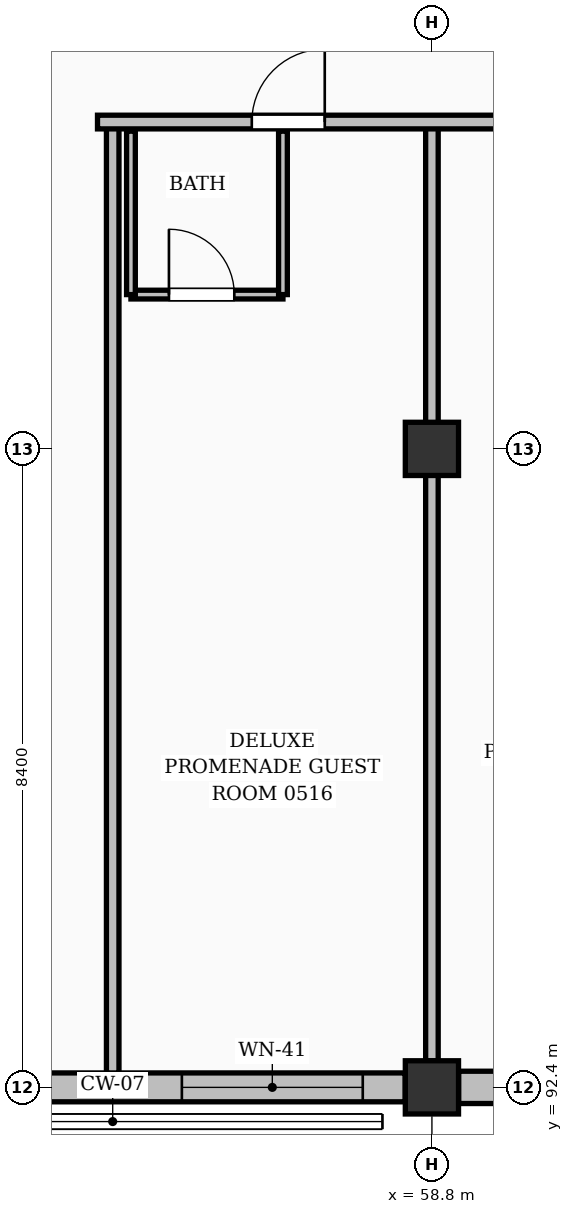
"""IFC4 building model, lengths in metres.
Left out: names, types, materials, properties, quantities, classifications, styles, units other than length and angle.
Written with IfcOpenShell. Run it as: python <this file> out.ifc"""

import sys

from ifc_helpers import new_model, si_unit, direction, frame, frame_2d, origin, origin_2d, place, context, subcontext, project, spatial, rectangle, extrude, element, fill, save


model = new_model("IFC4")
c1 = context("Model", 3, precision=1e-05, world=origin(), true_north=direction((0.0, 1.0)))
c2 = subcontext(c1, "Body", "Model", "MODEL_VIEW")
j1 = project(units=[si_unit("LENGTHUNIT", "METRE"), si_unit("PLANEANGLEUNIT", "RADIAN")], contexts=[c1])
p1 = place(None, origin())
s1 = spatial("IfcSite", under=j1, at=p1, CompositionType="ELEMENT")
p2 = place(p1, origin())
s2 = spatial("IfcBuilding", under=s1, at=p2, CompositionType="ELEMENT")
p3 = place(p2, frame((0.0, 0.0, 18.48)))
s3 = spatial("IfcBuildingStorey", under=s2, at=p3, CompositionType="ELEMENT", Elevation=18.48)
for number, where, z_axis, x_axis in (
    (1, (58.8, 92.4, 0.0), (0.0, 0.0, 1.0), (1.0, 0.0, 0.0)),
    (2, (58.8, 100.8, 0.0), (0.0, 0.0, 1.0), (1.0, 0.0, 0.0)),
):
    element("IfcColumn", number, at=place(p3, frame(where, z_axis=z_axis, x_axis=x_axis)), inside=s3, PredefinedType="COLUMN", context=c2, shape_type="SweptSolid", body=[
        extrude(rectangle(XDim=0.7, YDim=0.7, at=origin_2d()), origin(), (0.0, 0.0, 1.0), 3.36),
    ])
p4 = place(p3, frame((50.751, 92.4, 0.0), z_axis=(0.0, 0.0, 1.0), x_axis=(1.0, 0.0, 0.0)))
e3 = element("IfcWall", 3, at=p4, inside=s3, PredefinedType="SOLIDWALL", context=c2, shape_type="SweptSolid", body=[
    extrude(rectangle(XDim=7.698, YDim=0.38, at=frame_2d((3.849, 0.0))), origin(), (0.0, 0.0, 1.0), 2.494),
])
p5 = place(p4, frame((0.539, 0.0, 0.25)))
e4 = element("IfcOpeningElement", 4, at=p5, cuts=e3, PredefinedType="OPENING", context=c2, shape_type="SweptSolid", body=[
    extrude(rectangle(XDim=2.42, YDim=1.9, at=frame_2d((1.21, 0.95))), frame((0.0, 0.2, 0.0), z_axis=(0.0, -1.0, 0.0), x_axis=(1.0, 0.0, 0.0)), (0.0, 0.0, 1.0), 0.4),
])
p6 = place(p4, frame((4.759, 0.0, 0.25)))
e5 = element("IfcOpeningElement", 5, at=p6, cuts=e3, PredefinedType="OPENING", context=c2, shape_type="SweptSolid", body=[
    extrude(rectangle(XDim=2.38, YDim=2.0, at=frame_2d((1.19, 1.0))), frame((0.0, 0.2, 0.0), z_axis=(0.0, -1.0, 0.0), x_axis=(1.0, 0.0, 0.0)), (0.0, 0.0, 1.0), 0.4),
])
p7 = place(p3, frame((59.151, 92.4, 0.0), z_axis=(0.0, 0.0, 1.0), x_axis=(1.0, 0.0, 0.0)))
e6 = element("IfcWall", 6, at=p7, inside=s3, PredefinedType="SOLIDWALL", context=c2, shape_type="SweptSolid", body=[
    extrude(rectangle(XDim=7.698, YDim=0.425, at=frame_2d((3.849, 0.0))), origin(), (0.0, 0.0, 1.0), 2.494),
])
p8 = place(p7, frame((1.024, 0.0, 0.0)))
e7 = element("IfcOpeningElement", 7, at=p8, cuts=e6, PredefinedType="OPENING", context=c2, shape_type="SweptSolid", body=[
    extrude(rectangle(XDim=1.55, YDim=2.08, at=frame_2d((0.775, 1.04))), frame((0.0, 0.223, 0.0), z_axis=(0.0, -1.0, 0.0), x_axis=(1.0, 0.0, 0.0)), (0.0, 0.0, 1.0), 0.445),
])
p9 = place(p7, frame((4.609, 0.0, 0.25)))
e8 = element("IfcOpeningElement", 8, at=p9, cuts=e6, PredefinedType="OPENING", context=c2, shape_type="SweptSolid", body=[
    extrude(rectangle(XDim=2.38, YDim=2.0, at=frame_2d((1.19, 1.0))), frame((0.0, 0.223, 0.0), z_axis=(0.0, -1.0, 0.0), x_axis=(1.0, 0.0, 0.0)), (0.0, 0.0, 1.0), 0.445),
])
p10 = place(p3, frame((54.84, 102.83, 0.0), z_axis=(0.0, 0.0, 1.0), x_axis=(1.0, 0.0, 0.0)))
e9 = element("IfcWall", 9, at=p10, inside=s3, PredefinedType="PARTITIONING", context=c2, shape_type="SweptSolid", body=[
    extrude(rectangle(XDim=2.0, YDim=0.115, at=frame_2d((1.0, 0.0))), origin(), (0.0, 0.0, 1.0), 3.12),
])
p11 = place(p10, frame((0.5, 0.0, 0.0)))
e10 = element("IfcOpeningElement", 10, at=p11, cuts=e9, PredefinedType="OPENING", context=c2, shape_type="SweptSolid", body=[
    extrude(rectangle(XDim=0.86, YDim=2.05, at=frame_2d((0.43, 1.025))), frame((0.0, 0.067, 0.0), z_axis=(0.0, -1.0, 0.0), x_axis=(1.0, 0.0, 0.0)), (0.0, 0.0, 1.0), 0.135),
])
for number, where, z_axis, x_axis in (
    (11, (54.84, 102.83, 0.0), (0.0, 0.0, 1.0), (0.0, 1.0, 0.0)),
    (12, (56.84, 102.83, 0.0), (0.0, 0.0, 1.0), (0.0, 1.0, 0.0)),
):
    element("IfcWall", number, at=place(p3, frame(where, z_axis=z_axis, x_axis=x_axis)), inside=s3, PredefinedType="PARTITIONING", context=c2, shape_type="SweptSolid", body=[
        extrude(rectangle(XDim=2.15, YDim=0.115, at=frame_2d((1.075, 0.0))), origin(), (0.0, 0.0, 1.0), 3.12),
    ])
p12 = place(p3, frame((54.6, 92.59, 0.0), z_axis=(0.0, 0.0, 1.0), x_axis=(0.0, 1.0, 0.0)))
e13 = element("IfcWall", 13, at=p12, inside=s3, PredefinedType="PARTITIONING", context=c2, shape_type="SweptSolid", body=[
    extrude(rectangle(XDim=12.51, YDim=0.165, at=frame_2d((6.255, 0.0))), origin(), (0.0, 0.0, 1.0), 3.12),
])
p13 = place(p3, frame((58.8, 92.75, 0.0), z_axis=(0.0, 0.0, 1.0), x_axis=(0.0, 1.0, 0.0)))
e14 = element("IfcWall", 14, at=p13, inside=s3, PredefinedType="PARTITIONING", context=c2, shape_type="SweptSolid", body=[
    extrude(rectangle(XDim=12.35, YDim=0.165, at=frame_2d((6.175, 0.0))), origin(), (0.0, 0.0, 1.0), 2.455),
])
p14 = place(p3, frame((54.4, 105.1, 0.0), z_axis=(0.0, 0.0, 1.0), x_axis=(1.0, 0.0, 0.0)))
e15 = element("IfcWall", 15, at=p14, inside=s3, PredefinedType="PARTITIONING", context=c2, shape_type="SweptSolid", body=[
    extrude(rectangle(XDim=29.47, YDim=0.18, at=frame_2d((14.735, 0.0))), origin(), (0.0, 0.0, 1.0), 3.12),
])
p15 = place(p14, frame((2.03, 0.0, 0.0)))
e16 = element("IfcOpeningElement", 16, at=p15, cuts=e15, PredefinedType="OPENING", context=c2, shape_type="SweptSolid", body=[
    extrude(rectangle(XDim=0.96, YDim=2.15, at=frame_2d((0.48, 1.075))), frame((0.0, 0.1, 0.0), z_axis=(0.0, -1.0, 0.0), x_axis=(1.0, 0.0, 0.0)), (0.0, 0.0, 1.0), 0.2),
])
p16 = place(p14, frame((5.77, 0.0, 0.0)))
e17 = element("IfcOpeningElement", 17, at=p16, cuts=e15, PredefinedType="OPENING", context=c2, shape_type="SweptSolid", body=[
    extrude(rectangle(XDim=0.96, YDim=2.15, at=frame_2d((0.48, 1.075))), frame((0.0, 0.1, 0.0), z_axis=(0.0, -1.0, 0.0), x_axis=(1.0, 0.0, 0.0)), (0.0, 0.0, 1.0), 0.2),
])
p17 = place(p14, frame((10.43, 0.0, 0.0)))
e18 = element("IfcOpeningElement", 18, at=p17, cuts=e15, PredefinedType="OPENING", context=c2, shape_type="SweptSolid", body=[
    extrude(rectangle(XDim=0.96, YDim=2.15, at=frame_2d((0.48, 1.075))), frame((0.0, 0.1, 0.0), z_axis=(0.0, -1.0, 0.0), x_axis=(1.0, 0.0, 0.0)), (0.0, 0.0, 1.0), 0.2),
])
p18 = place(p14, frame((14.17, 0.0, 0.0)))
e19 = element("IfcOpeningElement", 19, at=p18, cuts=e15, PredefinedType="OPENING", context=c2, shape_type="SweptSolid", body=[
    extrude(rectangle(XDim=0.96, YDim=2.15, at=frame_2d((0.48, 1.075))), frame((0.0, 0.1, 0.0), z_axis=(0.0, -1.0, 0.0), x_axis=(1.0, 0.0, 0.0)), (0.0, 0.0, 1.0), 0.2),
])
p19 = place(p14, frame((18.83, 0.0, 0.0)))
e20 = element("IfcOpeningElement", 20, at=p19, cuts=e15, PredefinedType="OPENING", context=c2, shape_type="SweptSolid", body=[
    extrude(rectangle(XDim=0.96, YDim=2.15, at=frame_2d((0.48, 1.075))), frame((0.0, 0.1, 0.0), z_axis=(0.0, -1.0, 0.0), x_axis=(1.0, 0.0, 0.0)), (0.0, 0.0, 1.0), 0.2),
])
p20 = place(p14, frame((22.7, 0.0, 0.0)))
e21 = element("IfcOpeningElement", 21, at=p20, cuts=e15, PredefinedType="OPENING", context=c2, shape_type="SweptSolid", body=[
    extrude(rectangle(XDim=1.02, YDim=2.15, at=frame_2d((0.51, 1.075))), frame((0.0, 0.1, 0.0), z_axis=(0.0, -1.0, 0.0), x_axis=(1.0, 0.0, 0.0)), (0.0, 0.0, 1.0), 0.2),
])
p21 = place(p6, origin())
e22 = element("IfcWindow", 22, at=p21, inside=s3, PartitioningType="DOUBLE_PANEL_VERTICAL", PredefinedType="WINDOW", context=c2, shape_type="SweptSolid", body=[
    extrude(rectangle(XDim=2.38, YDim=2.0, at=frame_2d((1.19, 1.0))), frame((0.0, 0.03, 0.0), z_axis=(0.0, -1.0, 0.0), x_axis=(1.0, 0.0, 0.0)), (0.0, 0.0, 1.0), 0.06),
])
fill(e5, e22)
p22 = place(p11, origin())
e23 = element("IfcDoor", 23, at=p22, inside=s3, OperationType="SINGLE_SWING_LEFT", PredefinedType="DOOR", context=c2, shape_type="SweptSolid", body=[
    extrude(rectangle(XDim=0.86, YDim=2.05, at=frame_2d((0.43, 1.025))), frame((0.0, 0.025, 0.0), z_axis=(0.0, -1.0, 0.0), x_axis=(1.0, 0.0, 0.0)), (0.0, 0.0, 1.0), 0.05),
])
fill(e10, e23)
p23 = place(p15, origin())
e24 = element("IfcDoor", 24, at=p23, inside=s3, OperationType="SINGLE_SWING_RIGHT", PredefinedType="DOOR", context=c2, shape_type="SweptSolid", body=[
    extrude(rectangle(XDim=0.96, YDim=2.15, at=frame_2d((0.48, 1.075))), frame((0.0, 0.025, 0.0), z_axis=(0.0, -1.0, 0.0), x_axis=(1.0, 0.0, 0.0)), (0.0, 0.0, 1.0), 0.05),
])
fill(e16, e24)
save(model, sys.argv[1])
